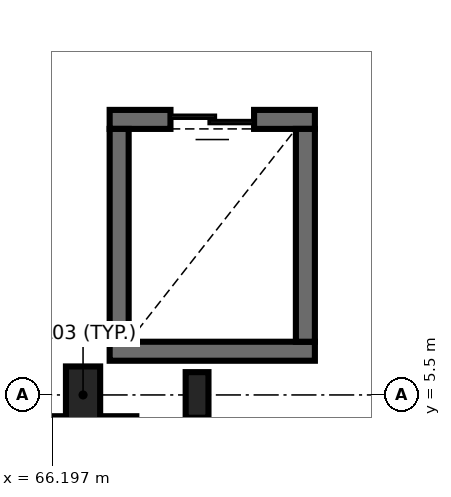
"""IFC4 building model, lengths in metres.
Left out: names, types, materials, properties, quantities, classifications, styles, units other than length and angle.
Written with IfcOpenShell. Run it as: python <this file> out.ifc"""

import sys

from ifc_helpers import new_model, si_unit, direction, frame, frame_2d, origin, origin_2d, place, context, subcontext, project, spatial, rectangle, i_section, extrude, element, fill, save


model = new_model("IFC4")
c1 = context("Model", 3, precision=1e-05, world=origin(), true_north=direction((0.0, 1.0)))
c2 = subcontext(c1, "Body", "Model", "MODEL_VIEW")
j1 = project(units=[si_unit("LENGTHUNIT", "METRE"), si_unit("PLANEANGLEUNIT", "RADIAN")], contexts=[c1])
p1 = place(None, origin())
s1 = spatial("IfcSite", under=j1, at=p1, CompositionType="ELEMENT")
p2 = place(p1, origin())
s2 = spatial("IfcBuilding", under=s1, at=p2, CompositionType="ELEMENT")
p3 = place(p2, frame((0.0, 0.0, 4.8)))
s3 = spatial("IfcBuildingStorey", under=s2, at=p3, CompositionType="ELEMENT", Elevation=4.8)
p4 = place(p3, frame((66.6, 5.5, 0.0), z_axis=(0.0, 0.0, 1.0), x_axis=(1.0, 0.0, 0.0)))
e1 = element("IfcColumn", 1, at=p4, inside=s3, PredefinedType="PILASTER", context=c2, shape_type="SweptSolid", body=[
    extrude(rectangle(XDim=0.45, YDim=0.75, at=origin_2d()), origin(), (0.0, 0.0, 1.0), 4.5),
])
p5 = place(p3, frame((68.1, 5.5, 0.0), z_axis=(0.0, 0.0, 1.0), x_axis=(1.0, 0.0, 0.0)))
e2 = element("IfcColumn", 2, at=p5, inside=s3, PredefinedType="COLUMN", context=c2, shape_type="SweptSolid", body=[
    extrude(i_section(OverallWidth=0.3, OverallDepth=0.6, WebThickness=0.015, FlangeThickness=0.03, FilletRadius=0.027, at=origin_2d()), origin(), (0.0, 0.0, 1.0), 4.5),
])
p6 = place(p3, frame((66.95, 6.075, 0.0), z_axis=(0.0, 0.0, 1.0), x_axis=(1.0, 0.0, 0.0)))
e3 = element("IfcWall", 3, at=p6, inside=s3, PredefinedType="SHEAR", context=c2, shape_type="SweptSolid", body=[
    extrude(rectangle(XDim=2.7, YDim=0.25, at=frame_2d((1.35, 0.0))), origin(), (0.0, 0.0, 1.0), 4.5),
])
p7 = place(p3, frame((69.65, 9.125, 0.0), z_axis=(0.0, 0.0, 1.0), x_axis=(-1.0, 0.0, 0.0)))
e4 = element("IfcWall", 4, at=p7, inside=s3, PredefinedType="SHEAR", context=c2, shape_type="SweptSolid", body=[
    extrude(rectangle(XDim=2.7, YDim=0.25, at=frame_2d((1.35, 0.0))), origin(), (0.0, 0.0, 1.0), 4.5),
])
p8 = place(p7, frame((0.8, 0.0, 0.0)))
e5 = element("IfcOpeningElement", 5, at=p8, cuts=e4, PredefinedType="OPENING", context=c2, shape_type="SweptSolid", body=[
    extrude(rectangle(XDim=1.1, YDim=2.15, at=frame_2d((0.55, 1.075))), frame((0.0, 0.135, 0.0), z_axis=(0.0, -1.0, 0.0), x_axis=(1.0, 0.0, 0.0)), (0.0, 0.0, 1.0), 0.27),
])
for number, where, z_axis, x_axis in (
    (6, (67.075, 9.0, 0.0), (0.0, 0.0, 1.0), (0.0, -1.0, 0.0)),
    (7, (69.525, 6.2, 0.0), (0.0, 0.0, 1.0), (0.0, 1.0, 0.0)),
):
    element("IfcWall", number, at=place(p3, frame(where, z_axis=z_axis, x_axis=x_axis)), inside=s3, PredefinedType="SHEAR", context=c2, shape_type="SweptSolid", body=[
        extrude(rectangle(XDim=2.8, YDim=0.25, at=frame_2d((1.4, 0.0))), origin(), (0.0, 0.0, 1.0), 4.5),
    ])
p9 = place(p3, frame((55.002, 5.06, 0.0), z_axis=(0.0, 0.0, 1.0), x_axis=(1.0, 0.0, 0.0)))
e8 = element("IfcWall", 8, at=p9, inside=s3, PredefinedType="SHEAR", context=c2, shape_type="SweptSolid", body=[
    extrude(rectangle(XDim=12.299, YDim=0.32, at=frame_2d((6.149, 0.0))), origin(), (0.0, 0.0, 1.0), 4.25),
])
p10 = place(p9, frame((8.583, 0.0, 0.9)))
e9 = element("IfcOpeningElement", 9, at=p10, cuts=e8, PredefinedType="OPENING", context=c2, shape_type="SweptSolid", body=[
    extrude(rectangle(XDim=1.8, YDim=1.8, at=frame_2d((0.9, 0.9))), frame((0.0, 0.17, 0.0), z_axis=(0.0, -1.0, 0.0), x_axis=(1.0, 0.0, 0.0)), (0.0, 0.0, 1.0), 0.34),
])
p11 = place(p8, origin())
e10 = element("IfcDoor", 10, at=p11, inside=s3, OperationType="DOUBLE_DOOR_SLIDING", PredefinedType="DOOR", context=c2, shape_type="SweptSolid", body=[
    extrude(rectangle(XDim=1.1, YDim=2.15, at=frame_2d((0.55, 1.075))), frame((0.0, 0.025, 0.0), z_axis=(0.0, -1.0, 0.0), x_axis=(1.0, 0.0, 0.0)), (0.0, 0.0, 1.0), 0.05),
])
fill(e5, e10)
save(model, sys.argv[1])
